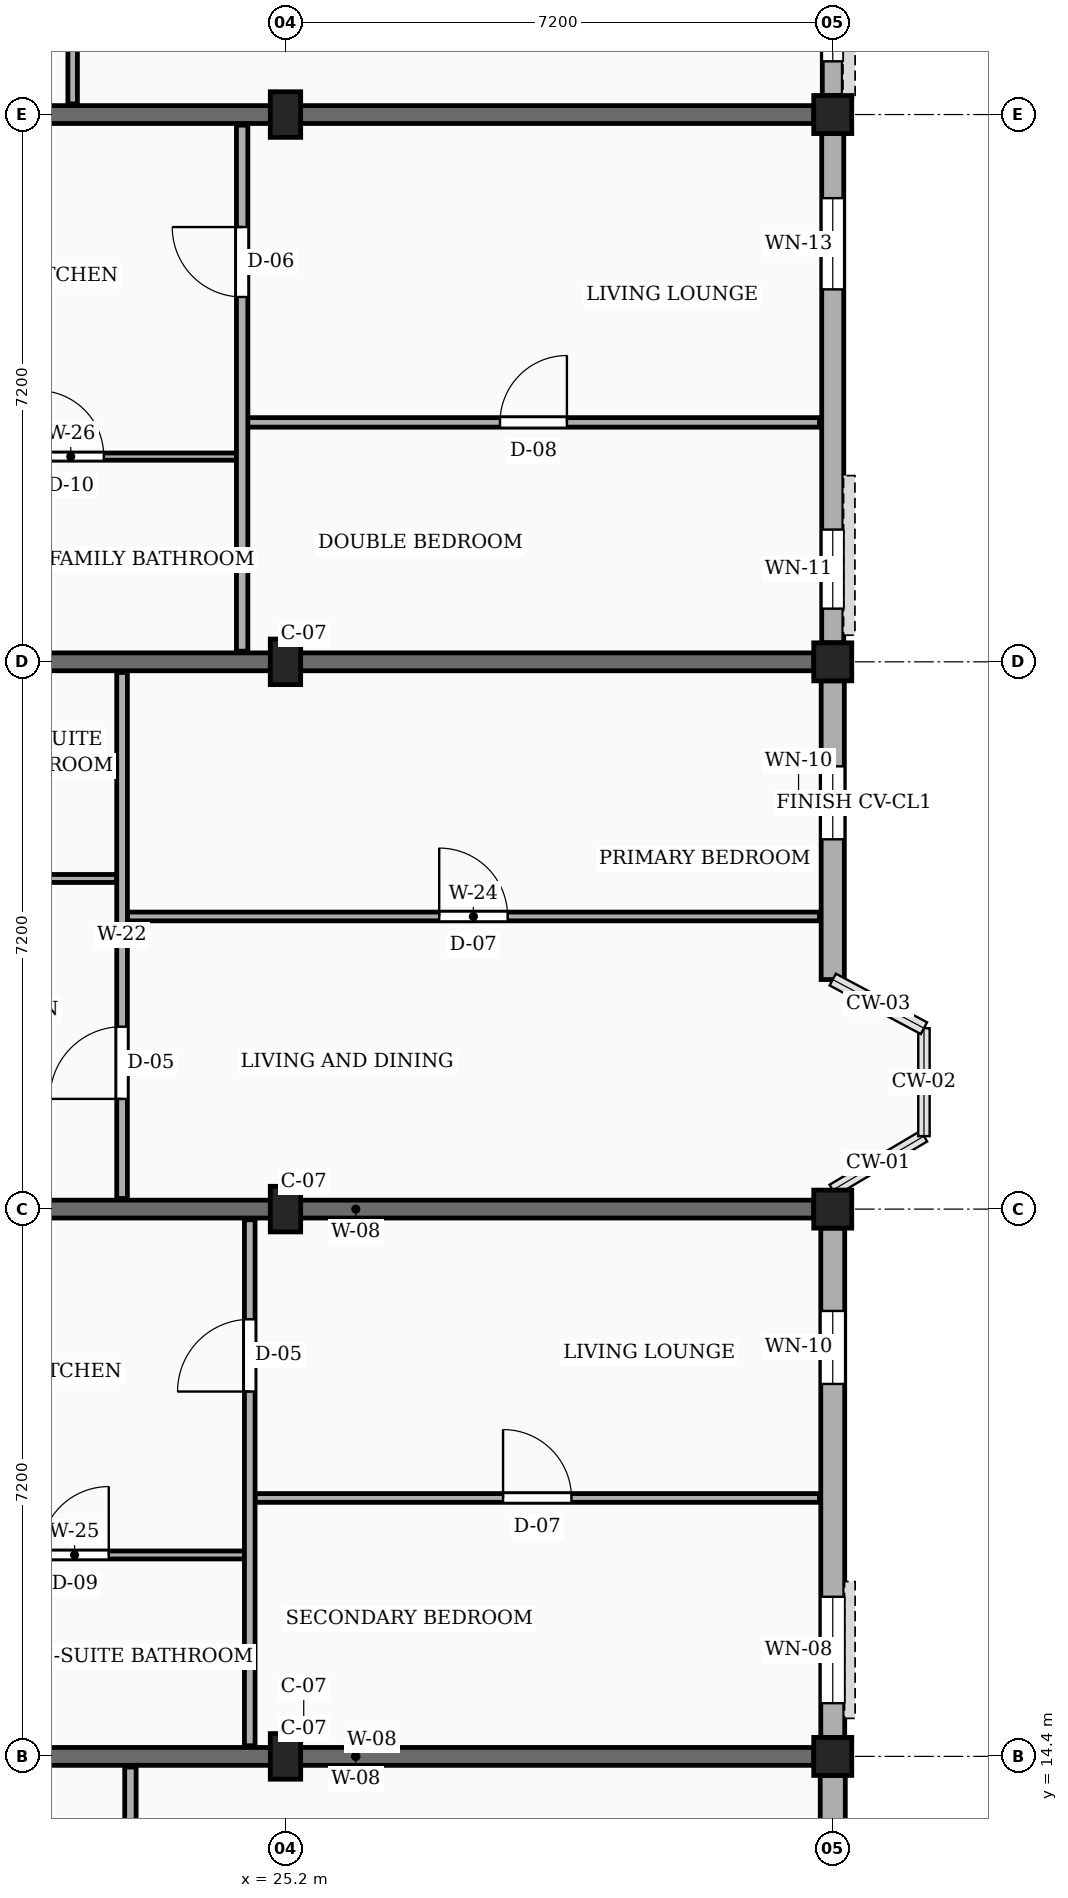
"""IFC4 building model, lengths in metres.
Left out: names, types, materials, properties, quantities, classifications, styles, units other than length and angle.
Written with IfcOpenShell. Run it as: python <this file> out.ifc"""

import sys

from ifc_helpers import new_model, si_unit, direction, frame, frame_2d, origin, origin_2d, place, context, subcontext, project, spatial, rectangle, extrude, element, fill, save


model = new_model("IFC4")
c1 = context("Model", 3, precision=1e-05, world=origin(), true_north=direction((0.0, 1.0)))
c2 = subcontext(c1, "Body", "Model", "MODEL_VIEW")
j1 = project(units=[si_unit("LENGTHUNIT", "METRE"), si_unit("PLANEANGLEUNIT", "RADIAN")], contexts=[c1])
p1 = place(None, origin())
s1 = spatial("IfcSite", under=j1, at=p1, CompositionType="ELEMENT")
p2 = place(p1, origin())
s2 = spatial("IfcBuilding", under=s1, at=p2, CompositionType="ELEMENT")
p3 = place(p2, frame((0.0, 0.0, 23.4)))
s3 = spatial("IfcBuildingStorey", under=s2, at=p3, CompositionType="ELEMENT", Elevation=23.4)
for number, where, z_axis, x_axis in (
    (1, (25.2, 14.4, 0.0), (0.0, 0.0, 1.0), (1.0, 0.0, 0.0)),
    (2, (25.2, 21.6, 0.0), (0.0, 0.0, 1.0), (1.0, 0.0, 0.0)),
    (3, (25.2, 28.8, 0.0), (0.0, 0.0, 1.0), (1.0, 0.0, 0.0)),
    (4, (25.2, 36.0, 0.0), (0.0, 0.0, 1.0), (1.0, 0.0, 0.0)),
):
    element("IfcColumn", number, at=place(p3, frame(where, z_axis=z_axis, x_axis=x_axis)), inside=s3, PredefinedType="COLUMN", context=c2, shape_type="SweptSolid", body=[
        extrude(rectangle(XDim=0.4, YDim=0.6, at=origin_2d()), origin(), (0.0, 0.0, 1.0), 3.15),
    ])
for number, where, z_axis, x_axis in (
    (5, (32.4, 14.4, 0.0), (0.0, 0.0, 1.0), (1.0, 0.0, 0.0)),
    (6, (32.4, 21.6, 0.0), (0.0, 0.0, 1.0), (1.0, 0.0, 0.0)),
    (7, (32.4, 28.8, 0.0), (0.0, 0.0, 1.0), (1.0, 0.0, 0.0)),
    (8, (32.4, 36.0, 0.0), (0.0, 0.0, 1.0), (1.0, 0.0, 0.0)),
):
    element("IfcColumn", number, at=place(p3, frame(where, z_axis=z_axis, x_axis=x_axis)), inside=s3, PredefinedType="COLUMN", context=c2, shape_type="SweptSolid", body=[
        extrude(rectangle(XDim=0.5, YDim=0.5, at=origin_2d()), origin(), (0.0, 0.0, 1.0), 3.15),
    ])
for number, where, z_axis, x_axis in (
    (9, (20.1, 14.4, 0.0), (0.0, 0.0, 1.0), (1.0, 0.0, 0.0)),
    (10, (20.1, 21.6, 0.0), (0.0, 0.0, 1.0), (1.0, 0.0, 0.0)),
    (11, (20.1, 28.8, 0.0), (0.0, 0.0, 1.0), (1.0, 0.0, 0.0)),
    (12, (20.1, 36.0, 0.0), (0.0, 0.0, 1.0), (1.0, 0.0, 0.0)),
):
    element("IfcWall", number, at=place(p3, frame(where, z_axis=z_axis, x_axis=x_axis)), inside=s3, PredefinedType="SOLIDWALL", context=c2, shape_type="SweptSolid", body=[
        extrude(rectangle(XDim=12.05, YDim=0.235, at=frame_2d((6.025, 0.0))), origin(), (0.0, 0.0, 1.0), 2.17),
    ])
p4 = place(p3, frame((32.4, 10.22, 0.0), z_axis=(0.0, 0.0, 1.0), x_axis=(0.0, 1.0, 0.0)))
e13 = element("IfcWall", 13, at=p4, inside=s3, PredefinedType="SOLIDWALL", context=c2, shape_type="SweptSolid", body=[
    extrude(rectangle(XDim=3.93, YDim=0.33, at=frame_2d((1.965, 0.0))), origin(), (0.0, 0.0, 1.0), 2.44),
])
p5 = place(p4, frame((1.715, 0.0, 0.78)))
e14 = element("IfcOpeningElement", 14, at=p5, cuts=e13, PredefinedType="OPENING", context=c2, shape_type="SweptSolid", body=[
    extrude(rectangle(XDim=1.32, YDim=1.15, at=frame_2d((0.66, 0.575))), frame((0.0, 0.175, 0.0), z_axis=(0.0, -1.0, 0.0), x_axis=(1.0, 0.0, 0.0)), (0.0, 0.0, 1.0), 0.35),
])
p6 = place(p3, frame((32.4, 14.65, 0.0), z_axis=(0.0, 0.0, 1.0), x_axis=(0.0, 1.0, 0.0)))
e15 = element("IfcWall", 15, at=p6, inside=s3, PredefinedType="SOLIDWALL", context=c2, shape_type="SweptSolid", body=[
    extrude(rectangle(XDim=6.7, YDim=0.315, at=frame_2d((3.35, 0.0))), origin(), (0.0, 0.0, 1.0), 2.44),
])
p7 = place(p6, frame((0.45, 0.0, 0.78)))
e16 = element("IfcOpeningElement", 16, at=p7, cuts=e15, PredefinedType="OPENING", context=c2, shape_type="SweptSolid", body=[
    extrude(rectangle(XDim=1.4, YDim=1.15, at=frame_2d((0.7, 0.575))), frame((0.0, 0.167, 0.0), z_axis=(0.0, -1.0, 0.0), x_axis=(1.0, 0.0, 0.0)), (0.0, 0.0, 1.0), 0.335),
])
p8 = place(p6, frame((4.65, 0.0, 0.78)))
e17 = element("IfcOpeningElement", 17, at=p8, cuts=e15, PredefinedType="OPENING", context=c2, shape_type="SweptSolid", body=[
    extrude(rectangle(XDim=0.96, YDim=1.26, at=frame_2d((0.48, 0.63))), frame((0.0, 0.167, 0.0), z_axis=(0.0, -1.0, 0.0), x_axis=(1.0, 0.0, 0.0)), (0.0, 0.0, 1.0), 0.335),
])
p9 = place(p3, frame((32.4, 24.62, 0.0), z_axis=(0.0, 0.0, 1.0), x_axis=(0.0, 1.0, 0.0)))
e18 = element("IfcWall", 18, at=p9, inside=s3, PredefinedType="SOLIDWALL", context=c2, shape_type="SweptSolid", body=[
    extrude(rectangle(XDim=3.93, YDim=0.305, at=frame_2d((1.965, 0.0))), origin(), (0.0, 0.0, 1.0), 2.44),
])
p10 = place(p9, frame((1.845, 0.0, 0.78)))
e19 = element("IfcOpeningElement", 19, at=p10, cuts=e18, PredefinedType="OPENING", context=c2, shape_type="SweptSolid", body=[
    extrude(rectangle(XDim=0.96, YDim=1.26, at=frame_2d((0.48, 0.63))), frame((0.0, 0.163, 0.0), z_axis=(0.0, -1.0, 0.0), x_axis=(1.0, 0.0, 0.0)), (0.0, 0.0, 1.0), 0.325),
])
p11 = place(p3, frame((32.4, 29.05, 0.0), z_axis=(0.0, 0.0, 1.0), x_axis=(0.0, 1.0, 0.0)))
e20 = element("IfcWall", 20, at=p11, inside=s3, PredefinedType="SOLIDWALL", context=c2, shape_type="SweptSolid", body=[
    extrude(rectangle(XDim=6.7, YDim=0.29, at=frame_2d((3.35, 0.0))), origin(), (0.0, 0.0, 1.0), 2.44),
])
p12 = place(p11, frame((0.45, 0.0, 0.78)))
e21 = element("IfcOpeningElement", 21, at=p12, cuts=e20, PredefinedType="OPENING", context=c2, shape_type="SweptSolid", body=[
    extrude(rectangle(XDim=1.04, YDim=1.26, at=frame_2d((0.52, 0.63))), frame((0.0, 0.155, 0.0), z_axis=(0.0, -1.0, 0.0), x_axis=(1.0, 0.0, 0.0)), (0.0, 0.0, 1.0), 0.31),
])
p13 = place(p11, frame((4.65, 0.0, 0.78)))
e22 = element("IfcOpeningElement", 22, at=p13, cuts=e20, PredefinedType="OPENING", context=c2, shape_type="SweptSolid", body=[
    extrude(rectangle(XDim=1.2, YDim=1.26, at=frame_2d((0.6, 0.63))), frame((0.0, 0.155, 0.0), z_axis=(0.0, -1.0, 0.0), x_axis=(1.0, 0.0, 0.0)), (0.0, 0.0, 1.0), 0.31),
])
p14 = place(p3, frame((32.4, 36.25, 0.0), z_axis=(0.0, 0.0, 1.0), x_axis=(0.0, 1.0, 0.0)))
e23 = element("IfcWall", 23, at=p14, inside=s3, PredefinedType="SOLIDWALL", context=c2, shape_type="SweptSolid", body=[
    extrude(rectangle(XDim=6.7, YDim=0.275, at=frame_2d((3.35, 0.0))), origin(), (0.0, 0.0, 1.0), 2.44),
])
p15 = place(p14, frame((0.45, 0.0, 0.78)))
e24 = element("IfcOpeningElement", 24, at=p15, cuts=e23, PredefinedType="OPENING", context=c2, shape_type="SweptSolid", body=[
    extrude(rectangle(XDim=1.2, YDim=1.26, at=frame_2d((0.6, 0.63))), frame((0.0, 0.147, 0.0), z_axis=(0.0, -1.0, 0.0), x_axis=(1.0, 0.0, 0.0)), (0.0, 0.0, 1.0), 0.295),
])
p16 = place(p14, frame((4.65, 0.0, 0.78)))
e25 = element("IfcOpeningElement", 25, at=p16, cuts=e23, PredefinedType="OPENING", context=c2, shape_type="SweptSolid", body=[
    extrude(rectangle(XDim=1.36, YDim=1.26, at=frame_2d((0.68, 0.63))), frame((0.0, 0.147, 0.0), z_axis=(0.0, -1.0, 0.0), x_axis=(1.0, 0.0, 0.0)), (0.0, 0.0, 1.0), 0.295),
])
p17 = place(p3, frame((23.16, 7.375, 0.0), z_axis=(0.0, 0.0, 1.0), x_axis=(0.0, 1.0, 0.0)))
e26 = element("IfcWall", 26, at=p17, inside=s3, PredefinedType="PARTITIONING", context=c2, shape_type="SweptSolid", body=[
    extrude(rectangle(XDim=6.885, YDim=0.15, at=frame_2d((3.442, 0.0))), origin(), (0.0, 0.0, 1.0), 2.305),
])
p18 = place(p17, frame((1.275, 0.0, 0.0)))
e27 = element("IfcOpeningElement", 27, at=p18, cuts=e26, PredefinedType="OPENING", context=c2, shape_type="SweptSolid", body=[
    extrude(rectangle(XDim=0.92, YDim=2.1, at=frame_2d((0.46, 1.05))), frame((0.0, 0.085, 0.0), z_axis=(0.0, -1.0, 0.0), x_axis=(1.0, 0.0, 0.0)), (0.0, 0.0, 1.0), 0.17),
])
p19 = place(p3, frame((24.8, 17.8, 0.0), z_axis=(0.0, 0.0, 1.0), x_axis=(1.0, 0.0, 0.0)))
e28 = element("IfcWall", 28, at=p19, inside=s3, PredefinedType="PARTITIONING", context=c2, shape_type="SweptSolid", body=[
    extrude(rectangle(XDim=7.425, YDim=0.115, at=frame_2d((3.712, 0.0))), origin(), (0.0, 0.0, 1.0), 2.305),
])
p20 = place(p19, frame((3.262, 0.0, 0.0)))
e29 = element("IfcOpeningElement", 29, at=p20, cuts=e28, PredefinedType="OPENING", context=c2, shape_type="SweptSolid", body=[
    extrude(rectangle(XDim=0.9, YDim=2.1, at=frame_2d((0.45, 1.05))), frame((0.0, 0.067, 0.0), z_axis=(0.0, -1.0, 0.0), x_axis=(1.0, 0.0, 0.0)), (0.0, 0.0, 1.0), 0.135),
])
p21 = place(p3, frame((20.19, 17.05, 0.0), z_axis=(0.0, 0.0, 1.0), x_axis=(1.0, 0.0, 0.0)))
e30 = element("IfcWall", 30, at=p21, inside=s3, PredefinedType="PARTITIONING", context=c2, shape_type="SweptSolid", body=[
    extrude(rectangle(XDim=4.47, YDim=0.105, at=frame_2d((2.235, 0.0))), origin(), (0.0, 0.0, 1.0), 2.305),
])
p22 = place(p21, frame((1.785, 0.0, 0.0)))
e31 = element("IfcOpeningElement", 31, at=p22, cuts=e30, PredefinedType="OPENING", context=c2, shape_type="SweptSolid", body=[
    extrude(rectangle(XDim=0.9, YDim=2.05, at=frame_2d((0.45, 1.025))), frame((0.0, 0.062, 0.0), z_axis=(0.0, -1.0, 0.0), x_axis=(1.0, 0.0, 0.0)), (0.0, 0.0, 1.0), 0.125),
])
p23 = place(p3, frame((24.73, 14.54, 0.0), z_axis=(0.0, 0.0, 1.0), x_axis=(0.0, 1.0, 0.0)))
e32 = element("IfcWall", 32, at=p23, inside=s3, PredefinedType="PARTITIONING", context=c2, shape_type="SweptSolid", body=[
    extrude(rectangle(XDim=6.92, YDim=0.14, at=frame_2d((3.46, 0.0))), origin(), (0.0, 0.0, 1.0), 2.305),
])
p24 = place(p23, frame((4.66, 0.0, 0.0)))
e33 = element("IfcOpeningElement", 33, at=p24, cuts=e32, PredefinedType="OPENING", context=c2, shape_type="SweptSolid", body=[
    extrude(rectangle(XDim=0.95, YDim=2.1, at=frame_2d((0.475, 1.05))), frame((0.0, 0.08, 0.0), z_axis=(0.0, -1.0, 0.0), x_axis=(1.0, 0.0, 0.0)), (0.0, 0.0, 1.0), 0.16),
])
p25 = place(p3, frame((23.12, 25.45, 0.0), z_axis=(0.0, 0.0, 1.0), x_axis=(1.0, 0.0, 0.0)))
e34 = element("IfcWall", 34, at=p25, inside=s3, PredefinedType="PARTITIONING", context=c2, shape_type="SweptSolid", body=[
    extrude(rectangle(XDim=9.105, YDim=0.115, at=frame_2d((4.552, 0.0))), origin(), (0.0, 0.0, 1.0), 2.305),
])
p26 = place(p25, frame((4.103, 0.0, 0.0)))
e35 = element("IfcOpeningElement", 35, at=p26, cuts=e34, PredefinedType="OPENING", context=c2, shape_type="SweptSolid", body=[
    extrude(rectangle(XDim=0.9, YDim=2.1, at=frame_2d((0.45, 1.05))), frame((0.0, 0.067, 0.0), z_axis=(0.0, -1.0, 0.0), x_axis=(1.0, 0.0, 0.0)), (0.0, 0.0, 1.0), 0.135),
])
p27 = place(p3, frame((20.19, 25.95, 0.0), z_axis=(0.0, 0.0, 1.0), x_axis=(1.0, 0.0, 0.0)))
e36 = element("IfcWall", 36, at=p27, inside=s3, PredefinedType="PARTITIONING", context=c2, shape_type="SweptSolid", body=[
    extrude(rectangle(XDim=2.79, YDim=0.105, at=frame_2d((1.395, 0.0))), origin(), (0.0, 0.0, 1.0), 2.305),
])
p28 = place(p27, frame((0.945, 0.0, 0.0)))
e37 = element("IfcOpeningElement", 37, at=p28, cuts=e36, PredefinedType="OPENING", context=c2, shape_type="SweptSolid", body=[
    extrude(rectangle(XDim=0.9, YDim=2.05, at=frame_2d((0.45, 1.025))), frame((0.0, 0.062, 0.0), z_axis=(0.0, -1.0, 0.0), x_axis=(1.0, 0.0, 0.0)), (0.0, 0.0, 1.0), 0.125),
])
p29 = place(p3, frame((23.05, 21.74, 0.0), z_axis=(0.0, 0.0, 1.0), x_axis=(0.0, 1.0, 0.0)))
e38 = element("IfcWall", 38, at=p29, inside=s3, PredefinedType="PARTITIONING", context=c2, shape_type="SweptSolid", body=[
    extrude(rectangle(XDim=6.92, YDim=0.14, at=frame_2d((3.46, 0.0))), origin(), (0.0, 0.0, 1.0), 2.305),
])
p30 = place(p29, frame((1.31, 0.0, 0.0)))
e39 = element("IfcOpeningElement", 39, at=p30, cuts=e38, PredefinedType="OPENING", context=c2, shape_type="SweptSolid", body=[
    extrude(rectangle(XDim=0.95, YDim=2.1, at=frame_2d((0.475, 1.05))), frame((0.0, 0.08, 0.0), z_axis=(0.0, -1.0, 0.0), x_axis=(1.0, 0.0, 0.0)), (0.0, 0.0, 1.0), 0.16),
])
p31 = place(p3, frame((24.7, 31.95, 0.0), z_axis=(0.0, 0.0, 1.0), x_axis=(1.0, 0.0, 0.0)))
e40 = element("IfcWall", 40, at=p31, inside=s3, PredefinedType="PARTITIONING", context=c2, shape_type="SweptSolid", body=[
    extrude(rectangle(XDim=7.525, YDim=0.125, at=frame_2d((3.763, 0.0))), origin(), (0.0, 0.0, 1.0), 2.305),
])
p32 = place(p31, frame((3.323, 0.0, 0.0)))
e41 = element("IfcOpeningElement", 41, at=p32, cuts=e40, PredefinedType="OPENING", context=c2, shape_type="SweptSolid", body=[
    extrude(rectangle(XDim=0.88, YDim=2.08, at=frame_2d((0.44, 1.04))), frame((0.0, 0.073, 0.0), z_axis=(0.0, -1.0, 0.0), x_axis=(1.0, 0.0, 0.0)), (0.0, 0.0, 1.0), 0.145),
])
p33 = place(p3, frame((20.19, 31.5, 0.0), z_axis=(0.0, 0.0, 1.0), x_axis=(1.0, 0.0, 0.0)))
e42 = element("IfcWall", 42, at=p33, inside=s3, PredefinedType="PARTITIONING", context=c2, shape_type="SweptSolid", body=[
    extrude(rectangle(XDim=4.37, YDim=0.095, at=frame_2d((2.185, 0.0))), origin(), (0.0, 0.0, 1.0), 2.305),
])
p34 = place(p33, frame((1.75, 0.0, 0.0)))
e43 = element("IfcOpeningElement", 43, at=p34, cuts=e42, PredefinedType="OPENING", context=c2, shape_type="SweptSolid", body=[
    extrude(rectangle(XDim=0.87, YDim=2.05, at=frame_2d((0.435, 1.025))), frame((0.0, 0.058, 0.0), z_axis=(0.0, -1.0, 0.0), x_axis=(1.0, 0.0, 0.0)), (0.0, 0.0, 1.0), 0.115),
])
p35 = place(p3, frame((24.63, 28.94, 0.0), z_axis=(0.0, 0.0, 1.0), x_axis=(0.0, 1.0, 0.0)))
e44 = element("IfcWall", 44, at=p35, inside=s3, PredefinedType="PARTITIONING", context=c2, shape_type="SweptSolid", body=[
    extrude(rectangle(XDim=6.92, YDim=0.15, at=frame_2d((3.46, 0.0))), origin(), (0.0, 0.0, 1.0), 2.305),
])
p36 = place(p35, frame((4.66, 0.0, 0.0)))
e45 = element("IfcOpeningElement", 45, at=p36, cuts=e44, PredefinedType="OPENING", context=c2, shape_type="SweptSolid", body=[
    extrude(rectangle(XDim=0.92, YDim=2.1, at=frame_2d((0.46, 1.05))), frame((0.0, 0.085, 0.0), z_axis=(0.0, -1.0, 0.0), x_axis=(1.0, 0.0, 0.0)), (0.0, 0.0, 1.0), 0.17),
])
p37 = place(p3, frame((22.4, 36.14, 0.0), z_axis=(0.0, 0.0, 1.0), x_axis=(0.0, 1.0, 0.0)))
e46 = element("IfcWall", 46, at=p37, inside=s3, PredefinedType="PARTITIONING", context=c2, shape_type="SweptSolid", body=[
    extrude(rectangle(XDim=2.41, YDim=0.125, at=frame_2d((1.205, 0.0))), origin(), (0.0, 0.0, 1.0), 2.305),
])
p38 = place(p7, origin())
e47 = element("IfcWindow", 47, at=p38, inside=s3, PartitioningType="SINGLE_PANEL", PredefinedType="WINDOW", context=c2, shape_type="SweptSolid", body=[
    extrude(rectangle(XDim=1.4, YDim=1.15, at=frame_2d((0.7, 0.575))), frame((0.0, 0.03, 0.0), z_axis=(0.0, -1.0, 0.0), x_axis=(1.0, 0.0, 0.0)), (0.0, 0.0, 1.0), 0.06),
])
fill(e16, e47)
p39 = place(p8, origin())
e48 = element("IfcWindow", 48, at=p39, inside=s3, PartitioningType="SINGLE_PANEL", PredefinedType="WINDOW", context=c2, shape_type="SweptSolid", body=[
    extrude(rectangle(XDim=0.96, YDim=1.26, at=frame_2d((0.48, 0.63))), frame((0.0, 0.03, 0.0), z_axis=(0.0, -1.0, 0.0), x_axis=(1.0, 0.0, 0.0)), (0.0, 0.0, 1.0), 0.06),
])
fill(e17, e48)
p40 = place(p10, origin())
e49 = element("IfcWindow", 49, at=p40, inside=s3, PartitioningType="SINGLE_PANEL", PredefinedType="WINDOW", context=c2, shape_type="SweptSolid", body=[
    extrude(rectangle(XDim=0.96, YDim=1.26, at=frame_2d((0.48, 0.63))), frame((0.0, 0.03, 0.0), z_axis=(0.0, -1.0, 0.0), x_axis=(1.0, 0.0, 0.0)), (0.0, 0.0, 1.0), 0.06),
])
fill(e19, e49)
p41 = place(p12, origin())
e50 = element("IfcWindow", 50, at=p41, inside=s3, PartitioningType="SINGLE_PANEL", PredefinedType="WINDOW", context=c2, shape_type="SweptSolid", body=[
    extrude(rectangle(XDim=1.04, YDim=1.26, at=frame_2d((0.52, 0.63))), frame((0.0, 0.03, 0.0), z_axis=(0.0, -1.0, 0.0), x_axis=(1.0, 0.0, 0.0)), (0.0, 0.0, 1.0), 0.06),
])
fill(e21, e50)
p42 = place(p13, origin())
e51 = element("IfcWindow", 51, at=p42, inside=s3, PartitioningType="SINGLE_PANEL", PredefinedType="WINDOW", context=c2, shape_type="SweptSolid", body=[
    extrude(rectangle(XDim=1.2, YDim=1.26, at=frame_2d((0.6, 0.63))), frame((0.0, 0.03, 0.0), z_axis=(0.0, -1.0, 0.0), x_axis=(1.0, 0.0, 0.0)), (0.0, 0.0, 1.0), 0.06),
])
fill(e22, e51)
p43 = place(p15, origin())
e52 = element("IfcWindow", 52, at=p43, inside=s3, PartitioningType="SINGLE_PANEL", PredefinedType="WINDOW", context=c2, shape_type="SweptSolid", body=[
    extrude(rectangle(XDim=1.2, YDim=1.26, at=frame_2d((0.6, 0.63))), frame((0.0, 0.03, 0.0), z_axis=(0.0, -1.0, 0.0), x_axis=(1.0, 0.0, 0.0)), (0.0, 0.0, 1.0), 0.06),
])
fill(e24, e52)
p44 = place(p20, origin())
e53 = element("IfcDoor", 53, at=p44, inside=s3, OperationType="SINGLE_SWING_LEFT", PredefinedType="DOOR", context=c2, shape_type="SweptSolid", body=[
    extrude(rectangle(XDim=0.9, YDim=2.1, at=frame_2d((0.45, 1.05))), frame((0.0, 0.025, 0.0), z_axis=(0.0, -1.0, 0.0), x_axis=(1.0, 0.0, 0.0)), (0.0, 0.0, 1.0), 0.05),
])
fill(e29, e53)
p45 = place(p22, origin())
e54 = element("IfcDoor", 54, at=p45, inside=s3, OperationType="SINGLE_SWING_RIGHT", PredefinedType="DOOR", context=c2, shape_type="SweptSolid", body=[
    extrude(rectangle(XDim=0.9, YDim=2.05, at=frame_2d((0.45, 1.025))), frame((0.0, 0.025, 0.0), z_axis=(0.0, -1.0, 0.0), x_axis=(1.0, 0.0, 0.0)), (0.0, 0.0, 1.0), 0.05),
])
fill(e31, e54)
p46 = place(p24, origin())
e55 = element("IfcDoor", 55, at=p46, inside=s3, OperationType="SINGLE_SWING_LEFT", PredefinedType="DOOR", context=c2, shape_type="SweptSolid", body=[
    extrude(rectangle(XDim=0.95, YDim=2.1, at=frame_2d((0.475, 1.05))), frame((0.0, 0.025, 0.0), z_axis=(0.0, -1.0, 0.0), x_axis=(1.0, 0.0, 0.0)), (0.0, 0.0, 1.0), 0.05),
])
fill(e33, e55)
p47 = place(p26, origin())
e56 = element("IfcDoor", 56, at=p47, inside=s3, OperationType="SINGLE_SWING_LEFT", PredefinedType="DOOR", context=c2, shape_type="SweptSolid", body=[
    extrude(rectangle(XDim=0.9, YDim=2.1, at=frame_2d((0.45, 1.05))), frame((0.0, 0.025, 0.0), z_axis=(0.0, -1.0, 0.0), x_axis=(1.0, 0.0, 0.0)), (0.0, 0.0, 1.0), 0.05),
])
fill(e35, e56)
p48 = place(p30, origin())
e57 = element("IfcDoor", 57, at=p48, inside=s3, OperationType="SINGLE_SWING_LEFT", PredefinedType="DOOR", context=c2, shape_type="SweptSolid", body=[
    extrude(rectangle(XDim=0.95, YDim=2.1, at=frame_2d((0.475, 1.05))), frame((0.0, 0.025, 0.0), z_axis=(0.0, -1.0, 0.0), x_axis=(1.0, 0.0, 0.0)), (0.0, 0.0, 1.0), 0.05),
])
fill(e39, e57)
p49 = place(p32, origin())
e58 = element("IfcDoor", 58, at=p49, inside=s3, OperationType="SINGLE_SWING_RIGHT", PredefinedType="DOOR", context=c2, shape_type="SweptSolid", body=[
    extrude(rectangle(XDim=0.88, YDim=2.08, at=frame_2d((0.44, 1.04))), frame((0.0, 0.025, 0.0), z_axis=(0.0, -1.0, 0.0), x_axis=(1.0, 0.0, 0.0)), (0.0, 0.0, 1.0), 0.05),
])
fill(e41, e58)
p50 = place(p34, origin())
e59 = element("IfcDoor", 59, at=p50, inside=s3, OperationType="SINGLE_SWING_LEFT", PredefinedType="DOOR", context=c2, shape_type="SweptSolid", body=[
    extrude(rectangle(XDim=0.87, YDim=2.05, at=frame_2d((0.435, 1.025))), frame((0.0, 0.025, 0.0), z_axis=(0.0, -1.0, 0.0), x_axis=(1.0, 0.0, 0.0)), (0.0, 0.0, 1.0), 0.05),
])
fill(e43, e59)
p51 = place(p36, origin())
e60 = element("IfcDoor", 60, at=p51, inside=s3, OperationType="SINGLE_SWING_RIGHT", PredefinedType="DOOR", context=c2, shape_type="SweptSolid", body=[
    extrude(rectangle(XDim=0.92, YDim=2.1, at=frame_2d((0.46, 1.05))), frame((0.0, 0.025, 0.0), z_axis=(0.0, -1.0, 0.0), x_axis=(1.0, 0.0, 0.0)), (0.0, 0.0, 1.0), 0.05),
])
fill(e45, e60)
save(model, sys.argv[1])
